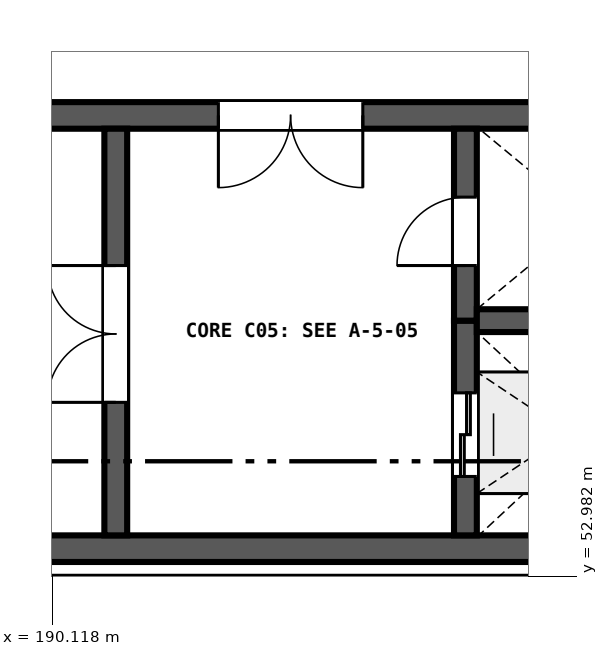
"""IFC4 building model, lengths in metres.
Left out: names, types, materials, properties, quantities, classifications, styles, units other than length and angle.
Written with IfcOpenShell. Run it as: python <this file> out.ifc"""

import sys

from ifc_helpers import new_model, si_unit, direction, frame, frame_2d, origin, place, context, subcontext, project, spatial, rectangle, extrude, element, fill, save


model = new_model("IFC4")
c1 = context("Model", 3, precision=1e-05, world=origin(), true_north=direction((0.0, 1.0)))
c2 = subcontext(c1, "Body", "Model", "MODEL_VIEW")
j1 = project(units=[si_unit("LENGTHUNIT", "METRE"), si_unit("PLANEANGLEUNIT", "RADIAN")], contexts=[c1])
p1 = place(None, origin())
s1 = spatial("IfcSite", under=j1, at=p1, CompositionType="ELEMENT")
p2 = place(p1, origin())
s2 = spatial("IfcBuilding", under=s1, at=p2, CompositionType="ELEMENT")
p3 = place(p2, frame((0.0, 0.0, 9.6)))
s3 = spatial("IfcBuildingStorey", under=s2, at=p3, CompositionType="ELEMENT", Elevation=9.6)
p4 = place(p3, frame((180.9, 53.35, 0.0), z_axis=(0.0, 0.0, 1.0), x_axis=(1.0, 0.0, 0.0)))
e1 = element("IfcWall", 1, at=p4, inside=s3, PredefinedType="SHEAR", context=c2, shape_type="SweptSolid", body=[
    extrude(rectangle(XDim=18.0, YDim=0.35, at=frame_2d((9.0, 0.0))), origin(), (0.0, 0.0, 1.0), 4.5),
])
p5 = place(p3, frame((198.9, 59.05, 0.0), z_axis=(0.0, 0.0, 1.0), x_axis=(-1.0, 0.0, 0.0)))
e2 = element("IfcWall", 2, at=p5, inside=s3, PredefinedType="SHEAR", context=c2, shape_type="SweptSolid", body=[
    extrude(rectangle(XDim=18.0, YDim=0.35, at=frame_2d((9.0, 0.0))), origin(), (0.0, 0.0, 1.0), 4.5),
])
p6 = place(p5, frame((4.7, 0.0, 0.0)))
e3 = element("IfcOpeningElement", 3, at=p6, cuts=e2, PredefinedType="OPENING", context=c2, shape_type="SweptSolid", body=[
    extrude(rectangle(XDim=1.9, YDim=2.25, at=frame_2d((0.95, 1.125))), frame((0.0, 0.185, 0.0), z_axis=(0.0, -1.0, 0.0), x_axis=(1.0, 0.0, 0.0)), (0.0, 0.0, 1.0), 0.37),
])
p7 = place(p3, frame((190.95, 53.525, 0.0), z_axis=(0.0, 0.0, 1.0), x_axis=(0.0, 1.0, 0.0)))
e4 = element("IfcWall", 4, at=p7, inside=s3, PredefinedType="SHEAR", context=c2, shape_type="SweptSolid", body=[
    extrude(rectangle(XDim=5.35, YDim=0.3, at=frame_2d((2.675, 0.0))), origin(), (0.0, 0.0, 1.0), 4.5),
])
p8 = place(p7, frame((1.75, 0.0, 0.0)))
e5 = element("IfcOpeningElement", 5, at=p8, cuts=e4, PredefinedType="OPENING", context=c2, shape_type="SweptSolid", body=[
    extrude(rectangle(XDim=1.8, YDim=2.25, at=frame_2d((0.9, 1.125))), frame((0.0, 0.16, 0.0), z_axis=(0.0, -1.0, 0.0), x_axis=(1.0, 0.0, 0.0)), (0.0, 0.0, 1.0), 0.32),
])
p9 = place(p3, frame((195.55, 53.525, 0.0), z_axis=(0.0, 0.0, 1.0), x_axis=(0.0, 1.0, 0.0)))
e6 = element("IfcWall", 6, at=p9, inside=s3, PredefinedType="SHEAR", context=c2, shape_type="SweptSolid", body=[
    extrude(rectangle(XDim=2.825, YDim=0.3, at=frame_2d((1.413, 0.0))), origin(), (0.0, 0.0, 1.0), 4.5),
])
p10 = place(p9, frame((0.775, 0.0, 0.0)))
e7 = element("IfcOpeningElement", 7, at=p10, cuts=e6, PredefinedType="OPENING", context=c2, shape_type="SweptSolid", body=[
    extrude(rectangle(XDim=1.1, YDim=2.1, at=frame_2d((0.55, 1.05))), frame((0.0, 0.16, 0.0), z_axis=(0.0, -1.0, 0.0), x_axis=(1.0, 0.0, 0.0)), (0.0, 0.0, 1.0), 0.32),
])
p11 = place(p3, frame((195.55, 56.35, 0.0), z_axis=(0.0, 0.0, 1.0), x_axis=(0.0, 1.0, 0.0)))
e8 = element("IfcWall", 8, at=p11, inside=s3, PredefinedType="SHEAR", context=c2, shape_type="SweptSolid", body=[
    extrude(rectangle(XDim=2.525, YDim=0.3, at=frame_2d((1.262, 0.0))), origin(), (0.0, 0.0, 1.0), 4.5),
])
p12 = place(p11, frame((0.725, 0.0, 0.0)))
e9 = element("IfcOpeningElement", 9, at=p12, cuts=e8, PredefinedType="OPENING", context=c2, shape_type="SweptSolid", body=[
    extrude(rectangle(XDim=0.9, YDim=2.1, at=frame_2d((0.45, 1.05))), frame((0.0, 0.16, 0.0), z_axis=(0.0, -1.0, 0.0), x_axis=(1.0, 0.0, 0.0)), (0.0, 0.0, 1.0), 0.32),
])
p13 = place(p3, frame((195.7, 56.35, 0.0), z_axis=(0.0, 0.0, 1.0), x_axis=(1.0, 0.0, 0.0)))
e10 = element("IfcWall", 10, at=p13, inside=s3, PredefinedType="SHEAR", context=c2, shape_type="SweptSolid", body=[
    extrude(rectangle(XDim=2.875, YDim=0.3, at=frame_2d((1.438, 0.0))), origin(), (0.0, 0.0, 1.0), 4.5),
])
p14 = place(p8, origin())
e11 = element("IfcDoor", 11, at=p14, inside=s3, OperationType="DOUBLE_DOOR_SINGLE_SWING", PredefinedType="DOOR", context=c2, shape_type="SweptSolid", body=[
    extrude(rectangle(XDim=1.8, YDim=2.25, at=frame_2d((0.9, 1.125))), frame((0.0, 0.025, 0.0), z_axis=(0.0, -1.0, 0.0), x_axis=(1.0, 0.0, 0.0)), (0.0, 0.0, 1.0), 0.05),
])
fill(e5, e11)
p15 = place(p12, origin())
e12 = element("IfcDoor", 12, at=p15, inside=s3, OperationType="SINGLE_SWING_LEFT", PredefinedType="DOOR", context=c2, shape_type="SweptSolid", body=[
    extrude(rectangle(XDim=0.9, YDim=2.1, at=frame_2d((0.45, 1.05))), frame((0.0, 0.025, 0.0), z_axis=(0.0, -1.0, 0.0), x_axis=(1.0, 0.0, 0.0)), (0.0, 0.0, 1.0), 0.05),
])
fill(e9, e12)
p16 = place(p10, origin())
e13 = element("IfcDoor", 13, at=p16, inside=s3, OperationType="DOUBLE_DOOR_SLIDING", PredefinedType="DOOR", context=c2, shape_type="SweptSolid", body=[
    extrude(rectangle(XDim=1.1, YDim=2.1, at=frame_2d((0.55, 1.05))), frame((0.0, 0.025, 0.0), z_axis=(0.0, -1.0, 0.0), x_axis=(1.0, 0.0, 0.0)), (0.0, 0.0, 1.0), 0.05),
])
fill(e7, e13)
p17 = place(p6, origin())
e14 = element("IfcDoor", 14, at=p17, inside=s3, OperationType="DOUBLE_DOOR_SINGLE_SWING", PredefinedType="DOOR", context=c2, shape_type="SweptSolid", body=[
    extrude(rectangle(XDim=1.9, YDim=2.25, at=frame_2d((0.95, 1.125))), frame((0.0, 0.025, 0.0), z_axis=(0.0, -1.0, 0.0), x_axis=(1.0, 0.0, 0.0)), (0.0, 0.0, 1.0), 0.05),
])
fill(e3, e14)
save(model, sys.argv[1])
